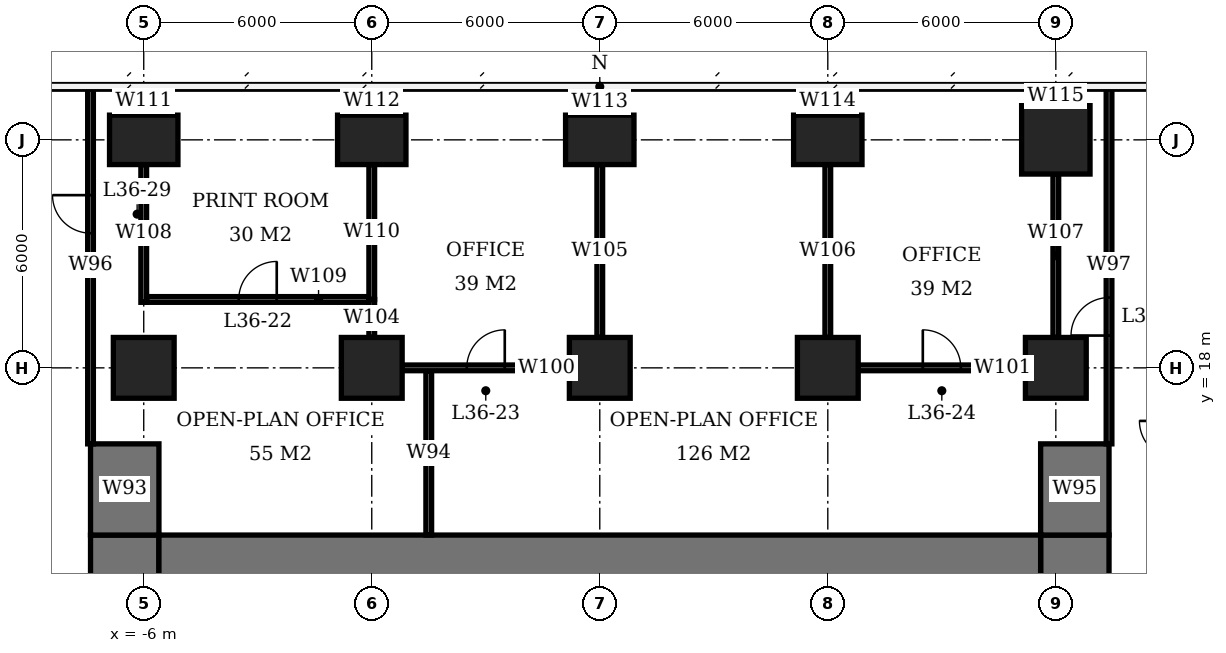
"""IFC4 building model, lengths in metres.
Left out: names, types, materials, properties, quantities, classifications, styles, units other than length and angle.
Written with IfcOpenShell. Run it as: python <this file> out.ifc"""

import sys

from ifc_helpers import new_model, si_unit, direction, frame, frame_2d, origin, origin_2d, place, context, subcontext, project, spatial, rectangle, extrude, element, fill, save


model = new_model("IFC4")
c1 = context("Model", 3, precision=1e-05, world=origin(), true_north=direction((0.0, 1.0)))
c2 = subcontext(c1, "Body", "Model", "MODEL_VIEW")
j1 = project(units=[si_unit("LENGTHUNIT", "METRE"), si_unit("PLANEANGLEUNIT", "RADIAN")], contexts=[c1])
p1 = place(None, origin())
s1 = spatial("IfcSite", under=j1, at=p1, CompositionType="ELEMENT")
p2 = place(p1, origin())
s2 = spatial("IfcBuilding", under=s1, at=p2, CompositionType="ELEMENT")
p3 = place(p2, frame((0.0, 0.0, 148.4)))
s3 = spatial("IfcBuildingStorey", under=s2, at=p3, CompositionType="ELEMENT", Elevation=148.4)
p4 = place(p3, frame((-6.0, 18.0, 0.0), z_axis=(0.0, 0.0, 1.0), x_axis=(1.0, 0.0, 0.0)))
e1 = element("IfcColumn", 1, at=p4, inside=s3, PredefinedType="COLUMN", context=c2, shape_type="SweptSolid", body=[
    extrude(rectangle(XDim=1.6, YDim=1.6, at=origin_2d()), origin(), (0.0, 0.0, 1.0), 3.9),
])
p5 = place(p3, frame((-6.0, 24.0, 0.0), z_axis=(0.0, 0.0, 1.0), x_axis=(1.0, 0.0, 0.0)))
e2 = element("IfcColumn", 2, at=p5, inside=s3, PredefinedType="COLUMN", context=c2, shape_type="SweptSolid", body=[
    extrude(rectangle(XDim=1.8, YDim=1.3, at=origin_2d()), origin(), (0.0, 0.0, 1.0), 3.9),
])
p6 = place(p3, frame((0.0, 18.0, 0.0), z_axis=(0.0, 0.0, 1.0), x_axis=(1.0, 0.0, 0.0)))
e3 = element("IfcColumn", 3, at=p6, inside=s3, PredefinedType="COLUMN", context=c2, shape_type="SweptSolid", body=[
    extrude(rectangle(XDim=1.6, YDim=1.6, at=origin_2d()), origin(), (0.0, 0.0, 1.0), 3.9),
])
p7 = place(p3, frame((0.0, 24.0, 0.0), z_axis=(0.0, 0.0, 1.0), x_axis=(1.0, 0.0, 0.0)))
e4 = element("IfcColumn", 4, at=p7, inside=s3, PredefinedType="COLUMN", context=c2, shape_type="SweptSolid", body=[
    extrude(rectangle(XDim=1.8, YDim=1.3, at=origin_2d()), origin(), (0.0, 0.0, 1.0), 3.9),
])
p8 = place(p3, frame((6.0, 18.0, 0.0), z_axis=(0.0, 0.0, 1.0), x_axis=(1.0, 0.0, 0.0)))
e5 = element("IfcColumn", 5, at=p8, inside=s3, PredefinedType="COLUMN", context=c2, shape_type="SweptSolid", body=[
    extrude(rectangle(XDim=1.6, YDim=1.6, at=origin_2d()), origin(), (0.0, 0.0, 1.0), 3.9),
])
p9 = place(p3, frame((6.0, 24.0, 0.0), z_axis=(0.0, 0.0, 1.0), x_axis=(1.0, 0.0, 0.0)))
e6 = element("IfcColumn", 6, at=p9, inside=s3, PredefinedType="COLUMN", context=c2, shape_type="SweptSolid", body=[
    extrude(rectangle(XDim=1.8, YDim=1.3, at=origin_2d()), origin(), (0.0, 0.0, 1.0), 3.9),
])
p10 = place(p3, frame((12.0, 18.0, 0.0), z_axis=(0.0, 0.0, 1.0), x_axis=(1.0, 0.0, 0.0)))
e7 = element("IfcColumn", 7, at=p10, inside=s3, PredefinedType="COLUMN", context=c2, shape_type="SweptSolid", body=[
    extrude(rectangle(XDim=1.6, YDim=1.6, at=origin_2d()), origin(), (0.0, 0.0, 1.0), 3.9),
])
p11 = place(p3, frame((12.0, 24.0, 0.0), z_axis=(0.0, 0.0, 1.0), x_axis=(1.0, 0.0, 0.0)))
e8 = element("IfcColumn", 8, at=p11, inside=s3, PredefinedType="COLUMN", context=c2, shape_type="SweptSolid", body=[
    extrude(rectangle(XDim=1.8, YDim=1.3, at=origin_2d()), origin(), (0.0, 0.0, 1.0), 3.9),
])
p12 = place(p3, frame((18.0, 18.0, 0.0), z_axis=(0.0, 0.0, 1.0), x_axis=(1.0, 0.0, 0.0)))
e9 = element("IfcColumn", 9, at=p12, inside=s3, PredefinedType="COLUMN", context=c2, shape_type="SweptSolid", body=[
    extrude(rectangle(XDim=1.6, YDim=1.6, at=origin_2d()), origin(), (0.0, 0.0, 1.0), 3.9),
])
p13 = place(p3, frame((18.0, 24.0, 0.0), z_axis=(0.0, 0.0, 1.0), x_axis=(1.0, 0.0, 0.0)))
e10 = element("IfcColumn", 10, at=p13, inside=s3, PredefinedType="COLUMN", context=c2, shape_type="SweptSolid", body=[
    extrude(rectangle(XDim=1.8, YDim=1.8, at=origin_2d()), origin(), (0.0, 0.0, 1.0), 3.9),
])
p14 = place(p3, frame((-5.6, 12.6, 0.0), z_axis=(0.0, 0.0, 1.0), x_axis=(1.0, 0.0, 0.0)))
e11 = element("IfcWall", 11, at=p14, inside=s3, PredefinedType="SHEAR", context=c2, shape_type="SweptSolid", body=[
    extrude(rectangle(XDim=23.2, YDim=2.0, at=frame_2d((11.6, 0.0))), origin(), (0.0, 0.0, 1.0), 3.9),
])
p15 = place(p3, frame((-6.5, -7.6, 0.0), z_axis=(0.0, 0.0, 1.0), x_axis=(0.0, 1.0, 0.0)))
e12 = element("IfcWall", 12, at=p15, inside=s3, PredefinedType="SHEAR", context=c2, shape_type="SweptSolid", body=[
    extrude(rectangle(XDim=21.2, YDim=1.8, at=frame_2d((10.6, 0.0))), origin(), (0.0, 0.0, 1.0), 3.9),
])
p16 = place(p15, frame((7.8, 0.0, 0.0)))
e13 = element("IfcOpeningElement", 13, at=p16, cuts=e12, PredefinedType="OPENING", context=c2, shape_type="SweptSolid", body=[
    extrude(rectangle(XDim=1.8, YDim=2.4, at=frame_2d((0.9, 1.2))), frame((0.0, 0.91, 0.0), z_axis=(0.0, -1.0, 0.0), x_axis=(1.0, 0.0, 0.0)), (0.0, 0.0, 1.0), 1.82),
])
p17 = place(p3, frame((18.5, -7.6, 0.0), z_axis=(0.0, 0.0, 1.0), x_axis=(0.0, 1.0, 0.0)))
e14 = element("IfcWall", 14, at=p17, inside=s3, PredefinedType="SHEAR", context=c2, shape_type="SweptSolid", body=[
    extrude(rectangle(XDim=21.2, YDim=1.8, at=frame_2d((10.6, 0.0))), origin(), (0.0, 0.0, 1.0), 3.9),
])
p18 = place(p17, frame((9.2, 0.0, 0.0)))
e15 = element("IfcOpeningElement", 15, at=p18, cuts=e14, PredefinedType="OPENING", context=c2, shape_type="SweptSolid", body=[
    extrude(rectangle(XDim=1.8, YDim=2.4, at=frame_2d((0.9, 1.2))), frame((0.0, 0.91, 0.0), z_axis=(0.0, -1.0, 0.0), x_axis=(1.0, 0.0, 0.0)), (0.0, 0.0, 1.0), 1.82),
])
for number, where, z_axis, x_axis in (
    (16, (-6.5, 13.6, 0.0), (0.0, 0.0, 1.0), (0.0, 1.0, 0.0)),
    (17, (18.5, 13.6, 0.0), (0.0, 0.0, 1.0), (0.0, 1.0, 0.0)),
):
    element("IfcWall", number, at=place(p3, frame(where, z_axis=z_axis, x_axis=x_axis)), inside=s3, PredefinedType="SHEAR", context=c2, shape_type="SweptSolid", body=[
        extrude(rectangle(XDim=2.4, YDim=1.8, at=frame_2d((1.2, 0.0))), origin(), (0.0, 0.0, 1.0), 3.9),
    ])
p19 = place(p3, frame((0.8, 18.0, 0.0), z_axis=(0.0, 0.0, 1.0), x_axis=(1.0, 0.0, 0.0)))
e18 = element("IfcWall", 18, at=p19, inside=s3, PredefinedType="PARTITIONING", context=c2, shape_type="SweptSolid", body=[
    extrude(rectangle(XDim=4.4, YDim=0.15, at=frame_2d((2.2, 0.0))), origin(), (0.0, 0.0, 1.0), 3.65),
])
p20 = place(p19, frame((1.7, 0.0, 0.0)))
e19 = element("IfcOpeningElement", 19, at=p20, cuts=e18, PredefinedType="OPENING", context=c2, shape_type="SweptSolid", body=[
    extrude(rectangle(XDim=1.0, YDim=2.1, at=frame_2d((0.5, 1.05))), frame((0.0, 0.085, 0.0), z_axis=(0.0, -1.0, 0.0), x_axis=(1.0, 0.0, 0.0)), (0.0, 0.0, 1.0), 0.17),
])
p21 = place(p3, frame((12.8, 18.0, 0.0), z_axis=(0.0, 0.0, 1.0), x_axis=(1.0, 0.0, 0.0)))
e20 = element("IfcWall", 20, at=p21, inside=s3, PredefinedType="PARTITIONING", context=c2, shape_type="SweptSolid", body=[
    extrude(rectangle(XDim=4.4, YDim=0.15, at=frame_2d((2.2, 0.0))), origin(), (0.0, 0.0, 1.0), 3.65),
])
p22 = place(p21, frame((1.7, 0.0, 0.0)))
e21 = element("IfcOpeningElement", 21, at=p22, cuts=e20, PredefinedType="OPENING", context=c2, shape_type="SweptSolid", body=[
    extrude(rectangle(XDim=1.0, YDim=2.1, at=frame_2d((0.5, 1.05))), frame((0.0, 0.085, 0.0), z_axis=(0.0, -1.0, 0.0), x_axis=(1.0, 0.0, 0.0)), (0.0, 0.0, 1.0), 0.17),
])
p23 = place(p3, frame((-5.925, 19.8, 0.0), z_axis=(0.0, 0.0, 1.0), x_axis=(1.0, 0.0, 0.0)))
e22 = element("IfcWall", 22, at=p23, inside=s3, PredefinedType="PARTITIONING", context=c2, shape_type="SweptSolid", body=[
    extrude(rectangle(XDim=5.85, YDim=0.15, at=frame_2d((2.925, 0.0))), origin(), (0.0, 0.0, 1.0), 3.65),
])
p24 = place(p23, frame((2.425, 0.0, 0.0)))
e23 = element("IfcOpeningElement", 23, at=p24, cuts=e22, PredefinedType="OPENING", context=c2, shape_type="SweptSolid", body=[
    extrude(rectangle(XDim=1.0, YDim=2.1, at=frame_2d((0.5, 1.05))), frame((0.0, 0.085, 0.0), z_axis=(0.0, -1.0, 0.0), x_axis=(1.0, 0.0, 0.0)), (0.0, 0.0, 1.0), 0.17),
])
p25 = place(p3, frame((-6.0, 19.725, 0.0), z_axis=(0.0, 0.0, 1.0), x_axis=(0.0, 1.0, 0.0)))
e24 = element("IfcWall", 24, at=p25, inside=s3, PredefinedType="PARTITIONING", context=c2, shape_type="SweptSolid", body=[
    extrude(rectangle(XDim=3.625, YDim=0.15, at=frame_2d((1.812, 0.0))), origin(), (0.0, 0.0, 1.0), 3.65),
])
p26 = place(p3, frame((-6.0, 24.65, 0.0), z_axis=(0.0, 0.0, 1.0), x_axis=(0.0, 1.0, 0.0)))
e25 = element("IfcWall", 25, at=p26, inside=s3, PredefinedType="PARTITIONING", context=c2, shape_type="SweptSolid", body=[
    extrude(rectangle(XDim=0.75, YDim=0.15, at=frame_2d((0.375, 0.0))), origin(), (0.0, 0.0, 1.0), 3.65),
])
p27 = place(p3, frame((0.0, 18.8, 0.0), z_axis=(0.0, 0.0, 1.0), x_axis=(0.0, 1.0, 0.0)))
e26 = element("IfcWall", 26, at=p27, inside=s3, PredefinedType="PARTITIONING", context=c2, shape_type="SweptSolid", body=[
    extrude(rectangle(XDim=1.0, YDim=0.15, at=frame_2d((0.5, 0.0))), origin(), (0.0, 0.0, 1.0), 3.65),
])
p28 = place(p3, frame((0.0, 19.8, 0.0), z_axis=(0.0, 0.0, 1.0), x_axis=(0.0, 1.0, 0.0)))
e27 = element("IfcWall", 27, at=p28, inside=s3, PredefinedType="PARTITIONING", context=c2, shape_type="SweptSolid", body=[
    extrude(rectangle(XDim=3.55, YDim=0.15, at=frame_2d((1.775, 0.0))), origin(), (0.0, 0.0, 1.0), 3.65),
])
p29 = place(p3, frame((0.0, 24.65, 0.0), z_axis=(0.0, 0.0, 1.0), x_axis=(0.0, 1.0, 0.0)))
e28 = element("IfcWall", 28, at=p29, inside=s3, PredefinedType="PARTITIONING", context=c2, shape_type="SweptSolid", body=[
    extrude(rectangle(XDim=0.75, YDim=0.15, at=frame_2d((0.375, 0.0))), origin(), (0.0, 0.0, 1.0), 3.65),
])
p30 = place(p3, frame((6.0, 18.8, 0.0), z_axis=(0.0, 0.0, 1.0), x_axis=(0.0, 1.0, 0.0)))
e29 = element("IfcWall", 29, at=p30, inside=s3, PredefinedType="PARTITIONING", context=c2, shape_type="SweptSolid", body=[
    extrude(rectangle(XDim=4.55, YDim=0.15, at=frame_2d((2.275, 0.0))), origin(), (0.0, 0.0, 1.0), 3.65),
])
p31 = place(p3, frame((6.0, 24.65, 0.0), z_axis=(0.0, 0.0, 1.0), x_axis=(0.0, 1.0, 0.0)))
e30 = element("IfcWall", 30, at=p31, inside=s3, PredefinedType="PARTITIONING", context=c2, shape_type="SweptSolid", body=[
    extrude(rectangle(XDim=0.7, YDim=0.15, at=frame_2d((0.35, 0.0))), origin(), (0.0, 0.0, 1.0), 3.65),
])
p32 = place(p3, frame((12.0, 18.8, 0.0), z_axis=(0.0, 0.0, 1.0), x_axis=(0.0, 1.0, 0.0)))
e31 = element("IfcWall", 31, at=p32, inside=s3, PredefinedType="PARTITIONING", context=c2, shape_type="SweptSolid", body=[
    extrude(rectangle(XDim=4.55, YDim=0.15, at=frame_2d((2.275, 0.0))), origin(), (0.0, 0.0, 1.0), 3.65),
])
p33 = place(p3, frame((12.0, 24.65, 0.0), z_axis=(0.0, 0.0, 1.0), x_axis=(0.0, 1.0, 0.0)))
e32 = element("IfcWall", 32, at=p33, inside=s3, PredefinedType="PARTITIONING", context=c2, shape_type="SweptSolid", body=[
    extrude(rectangle(XDim=0.75, YDim=0.15, at=frame_2d((0.375, 0.0))), origin(), (0.0, 0.0, 1.0), 3.65),
])
p34 = place(p3, frame((18.0, 18.8, 0.0), z_axis=(0.0, 0.0, 1.0), x_axis=(0.0, 1.0, 0.0)))
e33 = element("IfcWall", 33, at=p34, inside=s3, PredefinedType="PARTITIONING", context=c2, shape_type="SweptSolid", body=[
    extrude(rectangle(XDim=4.3, YDim=0.15, at=frame_2d((2.15, 0.0))), origin(), (0.0, 0.0, 1.0), 3.65),
])
p35 = place(p3, frame((18.0, 24.9, 0.0), z_axis=(0.0, 0.0, 1.0), x_axis=(0.0, 1.0, 0.0)))
e34 = element("IfcWall", 34, at=p35, inside=s3, PredefinedType="PARTITIONING", context=c2, shape_type="SweptSolid", body=[
    extrude(rectangle(XDim=0.5, YDim=0.15, at=frame_2d((0.25, 0.0))), origin(), (0.0, 0.0, 1.0), 3.65),
])
p36 = place(p3, frame((-7.4, 16.0, 0.0), z_axis=(0.0, 0.0, 1.0), x_axis=(0.0, 1.0, 0.0)))
e35 = element("IfcWall", 35, at=p36, inside=s3, PredefinedType="PARTITIONING", context=c2, shape_type="SweptSolid", body=[
    extrude(rectangle(XDim=9.4, YDim=0.15, at=frame_2d((4.7, 0.0))), origin(), (0.0, 0.0, 1.0), 3.65),
])
p37 = place(p36, frame((5.545, 0.0, 0.0)))
e36 = element("IfcOpeningElement", 36, at=p37, cuts=e35, PredefinedType="OPENING", context=c2, shape_type="SweptSolid", body=[
    extrude(rectangle(XDim=1.0, YDim=2.1, at=frame_2d((0.5, 1.05))), frame((0.0, 0.085, 0.0), z_axis=(0.0, -1.0, 0.0), x_axis=(1.0, 0.0, 0.0)), (0.0, 0.0, 1.0), 0.17),
])
p38 = place(p3, frame((1.5, 13.6, 0.0), z_axis=(0.0, 0.0, 1.0), x_axis=(0.0, 1.0, 0.0)))
e37 = element("IfcWall", 37, at=p38, inside=s3, PredefinedType="PARTITIONING", context=c2, shape_type="SweptSolid", body=[
    extrude(rectangle(XDim=4.325, YDim=0.15, at=frame_2d((2.163, 0.0))), origin(), (0.0, 0.0, 1.0), 3.65),
])
p39 = place(p3, frame((19.4, 16.0, 0.0), z_axis=(0.0, 0.0, 1.0), x_axis=(0.0, 1.0, 0.0)))
e38 = element("IfcWall", 38, at=p39, inside=s3, PredefinedType="PARTITIONING", context=c2, shape_type="SweptSolid", body=[
    extrude(rectangle(XDim=9.4, YDim=0.15, at=frame_2d((4.7, 0.0))), origin(), (0.0, 0.0, 1.0), 3.65),
])
p40 = place(p39, frame((2.85, 0.0, 0.0)))
e39 = element("IfcOpeningElement", 39, at=p40, cuts=e38, PredefinedType="OPENING", context=c2, shape_type="SweptSolid", body=[
    extrude(rectangle(XDim=1.0, YDim=2.1, at=frame_2d((0.5, 1.05))), frame((0.0, 0.085, 0.0), z_axis=(0.0, -1.0, 0.0), x_axis=(1.0, 0.0, 0.0)), (0.0, 0.0, 1.0), 0.17),
])
p41 = place(p24, origin())
e40 = element("IfcDoor", 40, at=p41, inside=s3, OperationType="SINGLE_SWING_RIGHT", PredefinedType="DOOR", context=c2, shape_type="SweptSolid", body=[
    extrude(rectangle(XDim=1.0, YDim=2.1, at=frame_2d((0.5, 1.05))), frame((0.0, 0.025, 0.0), z_axis=(0.0, -1.0, 0.0), x_axis=(1.0, 0.0, 0.0)), (0.0, 0.0, 1.0), 0.05),
])
fill(e23, e40)
p42 = place(p20, origin())
e41 = element("IfcDoor", 41, at=p42, inside=s3, OperationType="SINGLE_SWING_RIGHT", PredefinedType="DOOR", context=c2, shape_type="SweptSolid", body=[
    extrude(rectangle(XDim=1.0, YDim=2.1, at=frame_2d((0.5, 1.05))), frame((0.0, 0.025, 0.0), z_axis=(0.0, -1.0, 0.0), x_axis=(1.0, 0.0, 0.0)), (0.0, 0.0, 1.0), 0.05),
])
fill(e19, e41)
p43 = place(p22, origin())
e42 = element("IfcDoor", 42, at=p43, inside=s3, OperationType="SINGLE_SWING_LEFT", PredefinedType="DOOR", context=c2, shape_type="SweptSolid", body=[
    extrude(rectangle(XDim=1.0, YDim=2.1, at=frame_2d((0.5, 1.05))), frame((0.0, 0.025, 0.0), z_axis=(0.0, -1.0, 0.0), x_axis=(1.0, 0.0, 0.0)), (0.0, 0.0, 1.0), 0.05),
])
fill(e21, e42)
p44 = place(p37, origin())
e43 = element("IfcDoor", 43, at=p44, inside=s3, OperationType="SINGLE_SWING_RIGHT", PredefinedType="DOOR", context=c2, shape_type="SweptSolid", body=[
    extrude(rectangle(XDim=1.0, YDim=2.1, at=frame_2d((0.5, 1.05))), frame((0.0, 0.025, 0.0), z_axis=(0.0, -1.0, 0.0), x_axis=(1.0, 0.0, 0.0)), (0.0, 0.0, 1.0), 0.05),
])
fill(e36, e43)
p45 = place(p40, origin())
e44 = element("IfcDoor", 44, at=p45, inside=s3, OperationType="SINGLE_SWING_LEFT", PredefinedType="DOOR", context=c2, shape_type="SweptSolid", body=[
    extrude(rectangle(XDim=1.0, YDim=2.1, at=frame_2d((0.5, 1.05))), frame((0.0, 0.025, 0.0), z_axis=(0.0, -1.0, 0.0), x_axis=(1.0, 0.0, 0.0)), (0.0, 0.0, 1.0), 0.05),
])
fill(e39, e44)
save(model, sys.argv[1])
